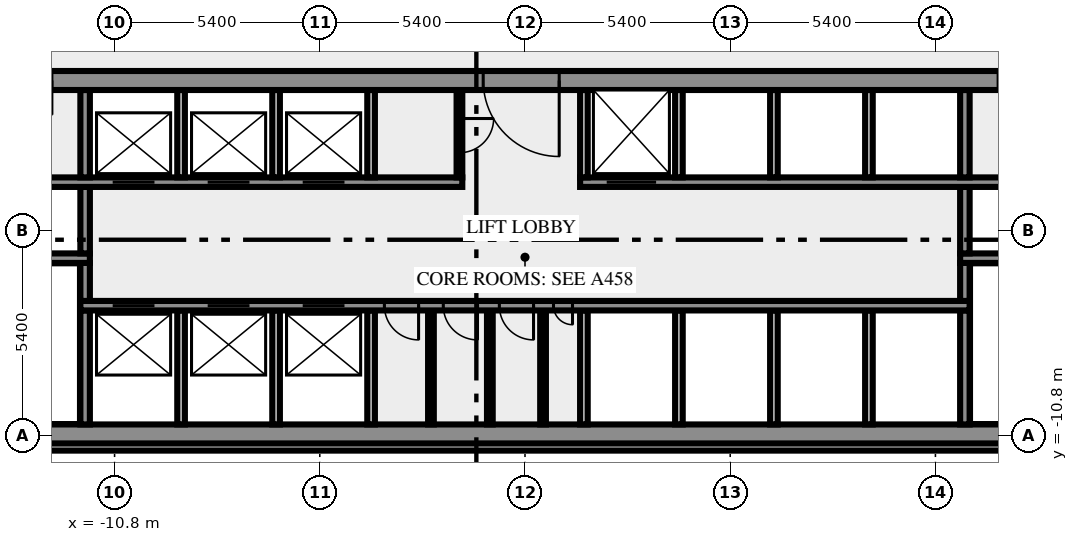
"""IFC4 building model, lengths in metres.
Left out: names, types, materials, properties, quantities, classifications, styles, units other than length and angle.
Written with IfcOpenShell. Run it as: python <this file> out.ifc"""

import sys

from ifc_helpers import new_model, si_unit, direction, frame, frame_2d, origin, place, context, subcontext, project, spatial, rectangle, extrude, element, fill, save


model = new_model("IFC4")
c1 = context("Model", 3, precision=1e-05, world=origin(), true_north=direction((0.0, 1.0)))
c2 = subcontext(c1, "Body", "Model", "MODEL_VIEW")
j1 = project(units=[si_unit("LENGTHUNIT", "METRE"), si_unit("PLANEANGLEUNIT", "RADIAN")], contexts=[c1])
p1 = place(None, origin())
s1 = spatial("IfcSite", under=j1, at=p1, CompositionType="ELEMENT")
p2 = place(p1, origin())
s2 = spatial("IfcBuilding", under=s1, at=p2, CompositionType="ELEMENT")
p3 = place(p2, frame((0.0, 0.0, 59.0)))
s3 = spatial("IfcBuildingStorey", under=s2, at=p3, CompositionType="ELEMENT", Elevation=59.0)
p4 = place(p3, frame((-17.444, -11.088, 0.0), z_axis=(0.0, 0.0, 1.0), x_axis=(1.0, 0.0, 0.0)))
e1 = element("IfcWall", 1, at=p4, inside=s3, PredefinedType="SOLIDWALL", context=c2, shape_type="SweptSolid", body=[
    extrude(rectangle(XDim=34.888, YDim=0.2, at=frame_2d((17.444, 0.0))), origin(), (0.0, 0.0, 1.0), 3.65),
])
p5 = place(p3, frame((-20.0, -10.75, 0.0), z_axis=(0.0, 0.0, 1.0), x_axis=(1.0, 0.0, 0.0)))
e2 = element("IfcWall", 2, at=p5, inside=s3, PredefinedType="SHEAR", context=c2, shape_type="SweptSolid", body=[
    extrude(rectangle(XDim=40.0, YDim=0.5, at=frame_2d((20.0, 0.0))), origin(), (0.0, 0.0, 1.0), 3.65),
])
p6 = place(p5, frame((0.8, 0.0, 1.0)))
e3 = element("IfcOpeningElement", 3, at=p6, cuts=e2, PredefinedType="OPENING", context=c2, shape_type="SweptSolid", body=[
    extrude(rectangle(XDim=1.2, YDim=1.2, at=frame_2d((0.6, 0.6))), frame((0.0, 0.26, 0.0), z_axis=(0.0, -1.0, 0.0), x_axis=(1.0, 0.0, 0.0)), (0.0, 0.0, 1.0), 0.52),
])
p7 = place(p5, frame((38.0, 0.0, 1.0)))
e4 = element("IfcOpeningElement", 4, at=p7, cuts=e2, PredefinedType="OPENING", context=c2, shape_type="SweptSolid", body=[
    extrude(rectangle(XDim=1.2, YDim=1.2, at=frame_2d((0.6, 0.6))), frame((0.0, 0.26, 0.0), z_axis=(0.0, -1.0, 0.0), x_axis=(1.0, 0.0, 0.0)), (0.0, 0.0, 1.0), 0.52),
])
p8 = place(p3, frame((-11.575, -10.5, 0.0), z_axis=(0.0, 0.0, 1.0), x_axis=(0.0, 1.0, 0.0)))
e5 = element("IfcWall", 5, at=p8, inside=s3, PredefinedType="SHEAR", context=c2, shape_type="SweptSolid", body=[
    extrude(rectangle(XDim=3.0, YDim=0.25, at=frame_2d((1.5, 0.0))), origin(), (0.0, 0.0, 1.0), 3.65),
])
for number, where, z_axis, x_axis in (
    (6, (-9.05, -10.5, 0.0), (0.0, 0.0, 1.0), (0.0, 1.0, 0.0)),
    (7, (-6.55, -10.5, 0.0), (0.0, 0.0, 1.0), (0.0, 1.0, 0.0)),
    (8, (-4.05, -10.5, 0.0), (0.0, 0.0, 1.0), (0.0, 1.0, 0.0)),
):
    element("IfcWall", number, at=place(p3, frame(where, z_axis=z_axis, x_axis=x_axis)), inside=s3, PredefinedType="SOLIDWALL", context=c2, shape_type="SweptSolid", body=[
        extrude(rectangle(XDim=3.0, YDim=0.2, at=frame_2d((1.5, 0.0))), origin(), (0.0, 0.0, 1.0), 3.65),
    ])
for number, where, z_axis, x_axis in (
    (9, (-2.475, -10.5, 0.0), (0.0, 0.0, 1.0), (0.0, 1.0, 0.0)),
    (10, (-0.925, -10.5, 0.0), (0.0, 0.0, 1.0), (0.0, 1.0, 0.0)),
    (11, (0.475, -10.5, 0.0), (0.0, 0.0, 1.0), (0.0, 1.0, 0.0)),
):
    element("IfcWall", number, at=place(p3, frame(where, z_axis=z_axis, x_axis=x_axis)), inside=s3, PredefinedType="PARTITIONING", context=c2, shape_type="SweptSolid", body=[
        extrude(rectangle(XDim=3.0, YDim=0.15, at=frame_2d((1.5, 0.0))), origin(), (0.0, 0.0, 1.0), 3.65),
    ])
for number, where, z_axis, x_axis in (
    (12, (1.55, -10.5, 0.0), (0.0, 0.0, 1.0), (0.0, 1.0, 0.0)),
    (13, (4.05, -10.5, 0.0), (0.0, 0.0, 1.0), (0.0, 1.0, 0.0)),
    (14, (6.55, -10.5, 0.0), (0.0, 0.0, 1.0), (0.0, 1.0, 0.0)),
    (15, (9.05, -10.5, 0.0), (0.0, 0.0, 1.0), (0.0, 1.0, 0.0)),
):
    element("IfcWall", number, at=place(p3, frame(where, z_axis=z_axis, x_axis=x_axis)), inside=s3, PredefinedType="SOLIDWALL", context=c2, shape_type="SweptSolid", body=[
        extrude(rectangle(XDim=3.0, YDim=0.2, at=frame_2d((1.5, 0.0))), origin(), (0.0, 0.0, 1.0), 3.65),
    ])
p9 = place(p3, frame((11.575, -10.5, 0.0), z_axis=(0.0, 0.0, 1.0), x_axis=(0.0, 1.0, 0.0)))
e16 = element("IfcWall", 16, at=p9, inside=s3, PredefinedType="SHEAR", context=c2, shape_type="SweptSolid", body=[
    extrude(rectangle(XDim=3.0, YDim=0.25, at=frame_2d((1.5, 0.0))), origin(), (0.0, 0.0, 1.0), 3.65),
])
p10 = place(p3, frame((11.7, -7.375, 0.0), z_axis=(0.0, 0.0, 1.0), x_axis=(-1.0, 0.0, 0.0)))
e17 = element("IfcWall", 17, at=p10, inside=s3, PredefinedType="SHEAR", context=c2, shape_type="SweptSolid", body=[
    extrude(rectangle(XDim=23.4, YDim=0.25, at=frame_2d((11.7, 0.0))), origin(), (0.0, 0.0, 1.0), 3.65),
])
p11 = place(p10, frame((21.45, 0.0, 0.0)))
e18 = element("IfcOpeningElement", 18, at=p11, cuts=e17, PredefinedType="OPENING", context=c2, shape_type="SweptSolid", body=[
    extrude(rectangle(XDim=1.1, YDim=2.1, at=frame_2d((0.55, 1.05))), frame((0.0, 0.135, 0.0), z_axis=(0.0, -1.0, 0.0), x_axis=(1.0, 0.0, 0.0)), (0.0, 0.0, 1.0), 0.27),
])
p12 = place(p10, frame((18.95, 0.0, 0.0)))
e19 = element("IfcOpeningElement", 19, at=p12, cuts=e17, PredefinedType="OPENING", context=c2, shape_type="SweptSolid", body=[
    extrude(rectangle(XDim=1.1, YDim=2.1, at=frame_2d((0.55, 1.05))), frame((0.0, 0.135, 0.0), z_axis=(0.0, -1.0, 0.0), x_axis=(1.0, 0.0, 0.0)), (0.0, 0.0, 1.0), 0.27),
])
p13 = place(p10, frame((16.45, 0.0, 0.0)))
e20 = element("IfcOpeningElement", 20, at=p13, cuts=e17, PredefinedType="OPENING", context=c2, shape_type="SweptSolid", body=[
    extrude(rectangle(XDim=1.1, YDim=2.1, at=frame_2d((0.55, 1.05))), frame((0.0, 0.135, 0.0), z_axis=(0.0, -1.0, 0.0), x_axis=(1.0, 0.0, 0.0)), (0.0, 0.0, 1.0), 0.27),
])
p14 = place(p10, frame((14.5, 0.0, 0.0)))
e21 = element("IfcOpeningElement", 21, at=p14, cuts=e17, PredefinedType="OPENING", context=c2, shape_type="SweptSolid", body=[
    extrude(rectangle(XDim=0.9, YDim=2.1, at=frame_2d((0.45, 1.05))), frame((0.0, 0.135, 0.0), z_axis=(0.0, -1.0, 0.0), x_axis=(1.0, 0.0, 0.0)), (0.0, 0.0, 1.0), 0.27),
])
p15 = place(p10, frame((12.95, 0.0, 0.0)))
e22 = element("IfcOpeningElement", 22, at=p15, cuts=e17, PredefinedType="OPENING", context=c2, shape_type="SweptSolid", body=[
    extrude(rectangle(XDim=0.9, YDim=2.1, at=frame_2d((0.45, 1.05))), frame((0.0, 0.135, 0.0), z_axis=(0.0, -1.0, 0.0), x_axis=(1.0, 0.0, 0.0)), (0.0, 0.0, 1.0), 0.27),
])
p16 = place(p10, frame((11.475, 0.0, 0.0)))
e23 = element("IfcOpeningElement", 23, at=p16, cuts=e17, PredefinedType="OPENING", context=c2, shape_type="SweptSolid", body=[
    extrude(rectangle(XDim=0.9, YDim=2.1, at=frame_2d((0.45, 1.05))), frame((0.0, 0.135, 0.0), z_axis=(0.0, -1.0, 0.0), x_axis=(1.0, 0.0, 0.0)), (0.0, 0.0, 1.0), 0.27),
])
p17 = place(p10, frame((10.45, 0.0, 0.0)))
e24 = element("IfcOpeningElement", 24, at=p17, cuts=e17, PredefinedType="OPENING", context=c2, shape_type="SweptSolid", body=[
    extrude(rectangle(XDim=0.5, YDim=2.1, at=frame_2d((0.25, 1.05))), frame((0.0, 0.135, 0.0), z_axis=(0.0, -1.0, 0.0), x_axis=(1.0, 0.0, 0.0)), (0.0, 0.0, 1.0), 0.27),
])
for number, where, z_axis, x_axis in (
    (25, (-11.575, -7.25, 0.0), (0.0, 0.0, 1.0), (0.0, 1.0, 0.0)),
    (26, (11.575, -7.25, 0.0), (0.0, 0.0, 1.0), (0.0, 1.0, 0.0)),
):
    element("IfcWall", number, at=place(p3, frame(where, z_axis=z_axis, x_axis=x_axis)), inside=s3, PredefinedType="SHEAR", context=c2, shape_type="SweptSolid", body=[
        extrude(rectangle(XDim=1.0, YDim=0.25, at=frame_2d((0.5, 0.0))), origin(), (0.0, 0.0, 1.0), 3.65),
    ])
p18 = place(p3, frame((-11.45, -6.125, 0.0), z_axis=(0.0, 0.0, 1.0), x_axis=(-1.0, 0.0, 0.0)))
e27 = element("IfcWall", 27, at=p18, inside=s3, PredefinedType="SHEAR", context=c2, shape_type="SweptSolid", body=[
    extrude(rectangle(XDim=8.05, YDim=0.25, at=frame_2d((4.025, 0.0))), origin(), (0.0, 0.0, 1.0), 3.65),
])
p19 = place(p18, frame((6.2, 0.0, 0.0)))
e28 = element("IfcOpeningElement", 28, at=p19, cuts=e27, PredefinedType="OPENING", context=c2, shape_type="SweptSolid", body=[
    extrude(rectangle(XDim=1.8, YDim=2.1, at=frame_2d((0.9, 1.05))), frame((0.0, 0.135, 0.0), z_axis=(0.0, -1.0, 0.0), x_axis=(1.0, 0.0, 0.0)), (0.0, 0.0, 1.0), 0.27),
])
p20 = place(p3, frame((19.5, -6.125, 0.0), z_axis=(0.0, 0.0, 1.0), x_axis=(-1.0, 0.0, 0.0)))
e29 = element("IfcWall", 29, at=p20, inside=s3, PredefinedType="SHEAR", context=c2, shape_type="SweptSolid", body=[
    extrude(rectangle(XDim=8.05, YDim=0.25, at=frame_2d((4.025, 0.0))), origin(), (0.0, 0.0, 1.0), 3.65),
])
p21 = place(p20, frame((0.05, 0.0, 0.0)))
e30 = element("IfcOpeningElement", 30, at=p21, cuts=e29, PredefinedType="OPENING", context=c2, shape_type="SweptSolid", body=[
    extrude(rectangle(XDim=1.8, YDim=2.1, at=frame_2d((0.9, 1.05))), frame((0.0, 0.135, 0.0), z_axis=(0.0, -1.0, 0.0), x_axis=(1.0, 0.0, 0.0)), (0.0, 0.0, 1.0), 0.27),
])
for number, where, z_axis, x_axis in (
    (31, (-11.575, -6.0, 0.0), (0.0, 0.0, 1.0), (0.0, 1.0, 0.0)),
    (32, (11.575, -6.0, 0.0), (0.0, 0.0, 1.0), (0.0, 1.0, 0.0)),
):
    element("IfcWall", number, at=place(p3, frame(where, z_axis=z_axis, x_axis=x_axis)), inside=s3, PredefinedType="SHEAR", context=c2, shape_type="SweptSolid", body=[
        extrude(rectangle(XDim=1.75, YDim=0.25, at=frame_2d((0.875, 0.0))), origin(), (0.0, 0.0, 1.0), 3.65),
    ])
p22 = place(p3, frame((-14.35, -4.125, 0.0), z_axis=(0.0, 0.0, 1.0), x_axis=(1.0, 0.0, 0.0)))
e33 = element("IfcWall", 33, at=p22, inside=s3, PredefinedType="SHEAR", context=c2, shape_type="SweptSolid", body=[
    extrude(rectangle(XDim=12.7, YDim=0.25, at=frame_2d((6.35, 0.0))), origin(), (0.0, 0.0, 1.0), 3.65),
])
p23 = place(p22, frame((3.5, 0.0, 0.0)))
e34 = element("IfcOpeningElement", 34, at=p23, cuts=e33, PredefinedType="OPENING", context=c2, shape_type="SweptSolid", body=[
    extrude(rectangle(XDim=1.1, YDim=2.1, at=frame_2d((0.55, 1.05))), frame((0.0, 0.135, 0.0), z_axis=(0.0, -1.0, 0.0), x_axis=(1.0, 0.0, 0.0)), (0.0, 0.0, 1.0), 0.27),
])
p24 = place(p22, frame((6.0, 0.0, 0.0)))
e35 = element("IfcOpeningElement", 35, at=p24, cuts=e33, PredefinedType="OPENING", context=c2, shape_type="SweptSolid", body=[
    extrude(rectangle(XDim=1.1, YDim=2.1, at=frame_2d((0.55, 1.05))), frame((0.0, 0.135, 0.0), z_axis=(0.0, -1.0, 0.0), x_axis=(1.0, 0.0, 0.0)), (0.0, 0.0, 1.0), 0.27),
])
p25 = place(p22, frame((8.5, 0.0, 0.0)))
e36 = element("IfcOpeningElement", 36, at=p25, cuts=e33, PredefinedType="OPENING", context=c2, shape_type="SweptSolid", body=[
    extrude(rectangle(XDim=1.1, YDim=2.1, at=frame_2d((0.55, 1.05))), frame((0.0, 0.135, 0.0), z_axis=(0.0, -1.0, 0.0), x_axis=(1.0, 0.0, 0.0)), (0.0, 0.0, 1.0), 0.27),
])
p26 = place(p3, frame((1.45, -4.125, 0.0), z_axis=(0.0, 0.0, 1.0), x_axis=(1.0, 0.0, 0.0)))
e37 = element("IfcWall", 37, at=p26, inside=s3, PredefinedType="SHEAR", context=c2, shape_type="SweptSolid", body=[
    extrude(rectangle(XDim=12.9, YDim=0.25, at=frame_2d((6.45, 0.0))), origin(), (0.0, 0.0, 1.0), 3.65),
])
p27 = place(p26, frame((0.7, 0.0, 0.0)))
e38 = element("IfcOpeningElement", 38, at=p27, cuts=e37, PredefinedType="OPENING", context=c2, shape_type="SweptSolid", body=[
    extrude(rectangle(XDim=1.3, YDim=2.1, at=frame_2d((0.65, 1.05))), frame((0.0, 0.135, 0.0), z_axis=(0.0, -1.0, 0.0), x_axis=(1.0, 0.0, 0.0)), (0.0, 0.0, 1.0), 0.27),
])
p28 = place(p3, frame((-11.575, -4.0, 0.0), z_axis=(0.0, 0.0, 1.0), x_axis=(0.0, 1.0, 0.0)))
e39 = element("IfcWall", 39, at=p28, inside=s3, PredefinedType="SHEAR", context=c2, shape_type="SweptSolid", body=[
    extrude(rectangle(XDim=2.3, YDim=0.25, at=frame_2d((1.15, 0.0))), origin(), (0.0, 0.0, 1.0), 3.65),
])
for number, where, z_axis, x_axis in (
    (40, (-9.05, -4.0, 0.0), (0.0, 0.0, 1.0), (0.0, 1.0, 0.0)),
    (41, (-6.55, -4.0, 0.0), (0.0, 0.0, 1.0), (0.0, 1.0, 0.0)),
    (42, (-4.05, -4.0, 0.0), (0.0, 0.0, 1.0), (0.0, 1.0, 0.0)),
):
    element("IfcWall", number, at=place(p3, frame(where, z_axis=z_axis, x_axis=x_axis)), inside=s3, PredefinedType="SOLIDWALL", context=c2, shape_type="SweptSolid", body=[
        extrude(rectangle(XDim=2.3, YDim=0.2, at=frame_2d((1.15, 0.0))), origin(), (0.0, 0.0, 1.0), 3.65),
    ])
p29 = place(p3, frame((-1.725, -1.7, 0.0), z_axis=(0.0, 0.0, 1.0), x_axis=(0.0, -1.0, 0.0)))
e43 = element("IfcWall", 43, at=p29, inside=s3, PredefinedType="PARTITIONING", context=c2, shape_type="SweptSolid", body=[
    extrude(rectangle(XDim=2.3, YDim=0.15, at=frame_2d((1.15, 0.0))), origin(), (0.0, 0.0, 1.0), 3.65),
])
p30 = place(p29, frame((0.75, 0.0, 0.0)))
e44 = element("IfcOpeningElement", 44, at=p30, cuts=e43, PredefinedType="OPENING", context=c2, shape_type="SweptSolid", body=[
    extrude(rectangle(XDim=0.9, YDim=2.1, at=frame_2d((0.45, 1.05))), frame((0.0, 0.085, 0.0), z_axis=(0.0, -1.0, 0.0), x_axis=(1.0, 0.0, 0.0)), (0.0, 0.0, 1.0), 0.17),
])
for number, where, z_axis, x_axis in (
    (45, (1.55, -4.0, 0.0), (0.0, 0.0, 1.0), (0.0, 1.0, 0.0)),
    (46, (4.05, -4.0, 0.0), (0.0, 0.0, 1.0), (0.0, 1.0, 0.0)),
    (47, (6.55, -4.0, 0.0), (0.0, 0.0, 1.0), (0.0, 1.0, 0.0)),
    (48, (9.05, -4.0, 0.0), (0.0, 0.0, 1.0), (0.0, 1.0, 0.0)),
):
    element("IfcWall", number, at=place(p3, frame(where, z_axis=z_axis, x_axis=x_axis)), inside=s3, PredefinedType="SOLIDWALL", context=c2, shape_type="SweptSolid", body=[
        extrude(rectangle(XDim=2.3, YDim=0.2, at=frame_2d((1.15, 0.0))), origin(), (0.0, 0.0, 1.0), 3.65),
    ])
p31 = place(p3, frame((11.575, -4.0, 0.0), z_axis=(0.0, 0.0, 1.0), x_axis=(0.0, 1.0, 0.0)))
e49 = element("IfcWall", 49, at=p31, inside=s3, PredefinedType="SHEAR", context=c2, shape_type="SweptSolid", body=[
    extrude(rectangle(XDim=2.3, YDim=0.25, at=frame_2d((1.15, 0.0))), origin(), (0.0, 0.0, 1.0), 3.65),
])
p32 = place(p3, frame((20.49, -1.45, 0.0), z_axis=(0.0, 0.0, 1.0), x_axis=(-1.0, 0.0, 0.0)))
e50 = element("IfcWall", 50, at=p32, inside=s3, PredefinedType="SHEAR", context=c2, shape_type="SweptSolid", body=[
    extrude(rectangle(XDim=40.98, YDim=0.5, at=frame_2d((20.49, 0.0))), origin(), (0.0, 0.0, 1.0), 3.65),
])
p33 = place(p32, frame((38.14, 0.0, 0.0)))
e51 = element("IfcOpeningElement", 51, at=p33, cuts=e50, PredefinedType="OPENING", context=c2, shape_type="SweptSolid", body=[
    extrude(rectangle(XDim=1.8, YDim=2.1, at=frame_2d((0.9, 1.05))), frame((0.0, 0.26, 0.0), z_axis=(0.0, -1.0, 0.0), x_axis=(1.0, 0.0, 0.0)), (0.0, 0.0, 1.0), 0.52),
])
p34 = place(p32, frame((35.89, 0.0, 0.0)))
e52 = element("IfcOpeningElement", 52, at=p34, cuts=e50, PredefinedType="OPENING", context=c2, shape_type="SweptSolid", body=[
    extrude(rectangle(XDim=0.9, YDim=2.1, at=frame_2d((0.45, 1.05))), frame((0.0, 0.26, 0.0), z_axis=(0.0, -1.0, 0.0), x_axis=(1.0, 0.0, 0.0)), (0.0, 0.0, 1.0), 0.52),
])
p35 = place(p32, frame((32.94, 0.0, 0.0)))
e53 = element("IfcOpeningElement", 53, at=p35, cuts=e50, PredefinedType="OPENING", context=c2, shape_type="SweptSolid", body=[
    extrude(rectangle(XDim=0.9, YDim=2.1, at=frame_2d((0.45, 1.05))), frame((0.0, 0.26, 0.0), z_axis=(0.0, -1.0, 0.0), x_axis=(1.0, 0.0, 0.0)), (0.0, 0.0, 1.0), 0.52),
])
p36 = place(p32, frame((19.59, 0.0, 0.0)))
e54 = element("IfcOpeningElement", 54, at=p36, cuts=e50, PredefinedType="OPENING", context=c2, shape_type="SweptSolid", body=[
    extrude(rectangle(XDim=2.0, YDim=2.1, at=frame_2d((1.0, 1.05))), frame((0.0, 0.26, 0.0), z_axis=(0.0, -1.0, 0.0), x_axis=(1.0, 0.0, 0.0)), (0.0, 0.0, 1.0), 0.52),
])
p37 = place(p32, frame((7.14, 0.0, 0.0)))
e55 = element("IfcOpeningElement", 55, at=p37, cuts=e50, PredefinedType="OPENING", context=c2, shape_type="SweptSolid", body=[
    extrude(rectangle(XDim=0.9, YDim=2.1, at=frame_2d((0.45, 1.05))), frame((0.0, 0.26, 0.0), z_axis=(0.0, -1.0, 0.0), x_axis=(1.0, 0.0, 0.0)), (0.0, 0.0, 1.0), 0.52),
])
p38 = place(p32, frame((5.028, 0.0, 0.0)))
e56 = element("IfcOpeningElement", 56, at=p38, cuts=e50, PredefinedType="OPENING", context=c2, shape_type="SweptSolid", body=[
    extrude(rectangle(XDim=0.8, YDim=2.1, at=frame_2d((0.4, 1.05))), frame((0.0, 0.26, 0.0), z_axis=(0.0, -1.0, 0.0), x_axis=(1.0, 0.0, 0.0)), (0.0, 0.0, 1.0), 0.52),
])
p39 = place(p32, frame((3.452, 0.0, 0.0)))
e57 = element("IfcOpeningElement", 57, at=p39, cuts=e50, PredefinedType="OPENING", context=c2, shape_type="SweptSolid", body=[
    extrude(rectangle(XDim=0.8, YDim=2.1, at=frame_2d((0.4, 1.05))), frame((0.0, 0.26, 0.0), z_axis=(0.0, -1.0, 0.0), x_axis=(1.0, 0.0, 0.0)), (0.0, 0.0, 1.0), 0.52),
])
p40 = place(p32, frame((1.04, 0.0, 0.0)))
e58 = element("IfcOpeningElement", 58, at=p40, cuts=e50, PredefinedType="OPENING", context=c2, shape_type="SweptSolid", body=[
    extrude(rectangle(XDim=1.8, YDim=2.1, at=frame_2d((0.9, 1.05))), frame((0.0, 0.26, 0.0), z_axis=(0.0, -1.0, 0.0), x_axis=(1.0, 0.0, 0.0)), (0.0, 0.0, 1.0), 0.52),
])
p41 = place(p11, origin())
e59 = element("IfcDoor", 59, at=p41, inside=s3, OperationType="DOUBLE_DOOR_SLIDING", PredefinedType="DOOR", context=c2, shape_type="SweptSolid", body=[
    extrude(rectangle(XDim=1.1, YDim=2.1, at=frame_2d((0.55, 1.05))), frame((0.0, 0.025, 0.0), z_axis=(0.0, -1.0, 0.0), x_axis=(1.0, 0.0, 0.0)), (0.0, 0.0, 1.0), 0.05),
])
fill(e18, e59)
p42 = place(p12, origin())
e60 = element("IfcDoor", 60, at=p42, inside=s3, OperationType="DOUBLE_DOOR_SLIDING", PredefinedType="DOOR", context=c2, shape_type="SweptSolid", body=[
    extrude(rectangle(XDim=1.1, YDim=2.1, at=frame_2d((0.55, 1.05))), frame((0.0, 0.025, 0.0), z_axis=(0.0, -1.0, 0.0), x_axis=(1.0, 0.0, 0.0)), (0.0, 0.0, 1.0), 0.05),
])
fill(e19, e60)
p43 = place(p13, origin())
e61 = element("IfcDoor", 61, at=p43, inside=s3, OperationType="DOUBLE_DOOR_SLIDING", PredefinedType="DOOR", context=c2, shape_type="SweptSolid", body=[
    extrude(rectangle(XDim=1.1, YDim=2.1, at=frame_2d((0.55, 1.05))), frame((0.0, 0.025, 0.0), z_axis=(0.0, -1.0, 0.0), x_axis=(1.0, 0.0, 0.0)), (0.0, 0.0, 1.0), 0.05),
])
fill(e20, e61)
p44 = place(p14, origin())
e62 = element("IfcDoor", 62, at=p44, inside=s3, OperationType="SINGLE_SWING_RIGHT", PredefinedType="DOOR", context=c2, shape_type="SweptSolid", body=[
    extrude(rectangle(XDim=0.9, YDim=2.1, at=frame_2d((0.45, 1.05))), frame((0.0, 0.025, 0.0), z_axis=(0.0, -1.0, 0.0), x_axis=(1.0, 0.0, 0.0)), (0.0, 0.0, 1.0), 0.05),
])
fill(e21, e62)
p45 = place(p15, origin())
e63 = element("IfcDoor", 63, at=p45, inside=s3, OperationType="SINGLE_SWING_RIGHT", PredefinedType="DOOR", context=c2, shape_type="SweptSolid", body=[
    extrude(rectangle(XDim=0.9, YDim=2.1, at=frame_2d((0.45, 1.05))), frame((0.0, 0.025, 0.0), z_axis=(0.0, -1.0, 0.0), x_axis=(1.0, 0.0, 0.0)), (0.0, 0.0, 1.0), 0.05),
])
fill(e22, e63)
p46 = place(p16, origin())
e64 = element("IfcDoor", 64, at=p46, inside=s3, OperationType="SINGLE_SWING_RIGHT", PredefinedType="DOOR", context=c2, shape_type="SweptSolid", body=[
    extrude(rectangle(XDim=0.9, YDim=2.1, at=frame_2d((0.45, 1.05))), frame((0.0, 0.025, 0.0), z_axis=(0.0, -1.0, 0.0), x_axis=(1.0, 0.0, 0.0)), (0.0, 0.0, 1.0), 0.05),
])
fill(e23, e64)
p47 = place(p17, origin())
e65 = element("IfcDoor", 65, at=p47, inside=s3, OperationType="SINGLE_SWING_LEFT", PredefinedType="DOOR", context=c2, shape_type="SweptSolid", body=[
    extrude(rectangle(XDim=0.5, YDim=2.1, at=frame_2d((0.25, 1.05))), frame((0.0, 0.025, 0.0), z_axis=(0.0, -1.0, 0.0), x_axis=(1.0, 0.0, 0.0)), (0.0, 0.0, 1.0), 0.05),
])
fill(e24, e65)
p48 = place(p23, origin())
e66 = element("IfcDoor", 66, at=p48, inside=s3, OperationType="DOUBLE_DOOR_SLIDING", PredefinedType="DOOR", context=c2, shape_type="SweptSolid", body=[
    extrude(rectangle(XDim=1.1, YDim=2.1, at=frame_2d((0.55, 1.05))), frame((0.0, 0.025, 0.0), z_axis=(0.0, -1.0, 0.0), x_axis=(1.0, 0.0, 0.0)), (0.0, 0.0, 1.0), 0.05),
])
fill(e34, e66)
p49 = place(p24, origin())
e67 = element("IfcDoor", 67, at=p49, inside=s3, OperationType="DOUBLE_DOOR_SLIDING", PredefinedType="DOOR", context=c2, shape_type="SweptSolid", body=[
    extrude(rectangle(XDim=1.1, YDim=2.1, at=frame_2d((0.55, 1.05))), frame((0.0, 0.025, 0.0), z_axis=(0.0, -1.0, 0.0), x_axis=(1.0, 0.0, 0.0)), (0.0, 0.0, 1.0), 0.05),
])
fill(e35, e67)
p50 = place(p25, origin())
e68 = element("IfcDoor", 68, at=p50, inside=s3, OperationType="DOUBLE_DOOR_SLIDING", PredefinedType="DOOR", context=c2, shape_type="SweptSolid", body=[
    extrude(rectangle(XDim=1.1, YDim=2.1, at=frame_2d((0.55, 1.05))), frame((0.0, 0.025, 0.0), z_axis=(0.0, -1.0, 0.0), x_axis=(1.0, 0.0, 0.0)), (0.0, 0.0, 1.0), 0.05),
])
fill(e36, e68)
p51 = place(p27, origin())
e69 = element("IfcDoor", 69, at=p51, inside=s3, OperationType="DOUBLE_DOOR_SLIDING", PredefinedType="DOOR", context=c2, shape_type="SweptSolid", body=[
    extrude(rectangle(XDim=1.3, YDim=2.1, at=frame_2d((0.65, 1.05))), frame((0.0, 0.025, 0.0), z_axis=(0.0, -1.0, 0.0), x_axis=(1.0, 0.0, 0.0)), (0.0, 0.0, 1.0), 0.05),
])
fill(e38, e69)
p52 = place(p30, origin())
e70 = element("IfcDoor", 70, at=p52, inside=s3, OperationType="SINGLE_SWING_RIGHT", PredefinedType="DOOR", context=c2, shape_type="SweptSolid", body=[
    extrude(rectangle(XDim=0.9, YDim=2.1, at=frame_2d((0.45, 1.05))), frame((0.0, 0.025, 0.0), z_axis=(0.0, -1.0, 0.0), x_axis=(1.0, 0.0, 0.0)), (0.0, 0.0, 1.0), 0.05),
])
fill(e44, e70)
p53 = place(p36, origin())
e71 = element("IfcDoor", 71, at=p53, inside=s3, OperationType="DOUBLE_DOOR_SINGLE_SWING", PredefinedType="DOOR", context=c2, shape_type="SweptSolid", body=[
    extrude(rectangle(XDim=2.0, YDim=2.1, at=frame_2d((1.0, 1.05))), frame((0.0, 0.025, 0.0), z_axis=(0.0, -1.0, 0.0), x_axis=(1.0, 0.0, 0.0)), (0.0, 0.0, 1.0), 0.05),
])
fill(e54, e71)
save(model, sys.argv[1])
